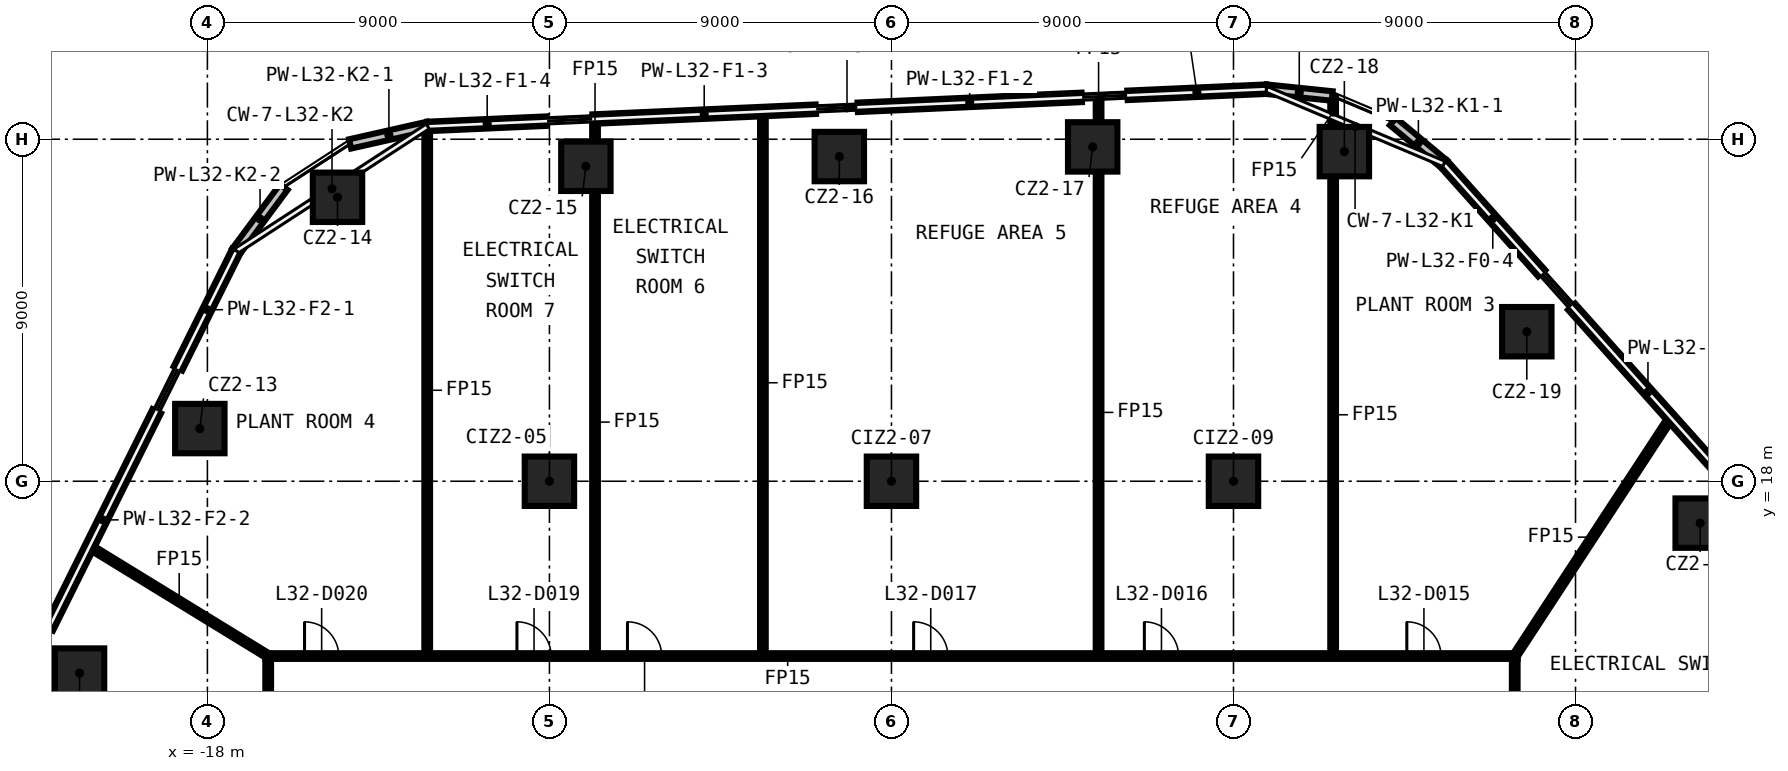
"""IFC4 building model, lengths in metres.
Left out: names, types, materials, properties, quantities, classifications, styles, units other than length and angle.
Written with IfcOpenShell. Run it as: python <this file> out.ifc"""

import sys

from ifc_helpers import new_model, si_unit, direction, frame, frame_2d, origin, origin_2d, place, context, subcontext, project, spatial, rectangle, extrude, element, fill, save


model = new_model("IFC4")
c1 = context("Model", 3, precision=1e-05, world=origin(), true_north=direction((0.0, 1.0)))
c2 = subcontext(c1, "Body", "Model", "MODEL_VIEW")
j1 = project(units=[si_unit("LENGTHUNIT", "METRE"), si_unit("PLANEANGLEUNIT", "RADIAN")], contexts=[c1])
p1 = place(None, origin())
s1 = spatial("IfcSite", under=j1, at=p1, CompositionType="ELEMENT")
p2 = place(p1, origin())
s2 = spatial("IfcBuilding", under=s1, at=p2, CompositionType="ELEMENT")
p3 = place(p2, frame((0.0, 0.0, 145.6)))
s3 = spatial("IfcBuildingStorey", under=s2, at=p3, CompositionType="ELEMENT", Elevation=145.6)
for number, where, z_axis, x_axis in (
    (1, (-21.364, 12.952, 0.0), (0.0, 0.0, 1.0), (1.0, 0.0, 0.0)),
    (2, (-18.199, 19.386, 0.0), (0.0, 0.0, 1.0), (1.0, 0.0, 0.0)),
    (3, (-14.576, 25.472, 0.0), (0.0, 0.0, 1.0), (1.0, 0.0, 0.0)),
    (4, (-8.041, 26.288, 0.0), (0.0, 0.0, 1.0), (1.0, 0.0, 0.0)),
    (5, (-1.372, 26.544, 0.0), (0.0, 0.0, 1.0), (1.0, 0.0, 0.0)),
    (6, (5.295, 26.798, 0.0), (0.0, 0.0, 1.0), (1.0, 0.0, 0.0)),
    (7, (11.917, 26.674, 0.0), (0.0, 0.0, 1.0), (1.0, 0.0, 0.0)),
    (8, (16.718, 21.935, 0.0), (0.0, 0.0, 1.0), (1.0, 0.0, 0.0)),
    (9, (21.28, 16.898, 0.0), (0.0, 0.0, 1.0), (1.0, 0.0, 0.0)),
    (10, (-9.0, 18.0, 0.0), (0.0, 0.0, 1.0), (1.0, 0.0, 0.0)),
    (11, (0.0, 18.0, 0.0), (0.0, 0.0, 1.0), (1.0, 0.0, 0.0)),
    (12, (9.0, 18.0, 0.0), (0.0, 0.0, 1.0), (1.0, 0.0, 0.0)),
):
    element("IfcColumn", number, at=place(p3, frame(where, z_axis=z_axis, x_axis=x_axis)), inside=s3, PredefinedType="COLUMN", context=c2, shape_type="SweptSolid", body=[
        extrude(rectangle(XDim=1.3, YDim=1.3, at=origin_2d()), origin(), (0.0, 0.0, 1.0), 5.55),
    ])
p4 = place(p3, frame((-16.475, 13.4, 0.0), z_axis=(0.0, 0.0, 1.0), x_axis=(1.0, 0.0, 0.0)))
e13 = element("IfcWall", 13, at=p4, inside=s3, PredefinedType="PARTITIONING", context=c2, shape_type="SweptSolid", body=[
    extrude(rectangle(XDim=32.95, YDim=0.15, at=frame_2d((16.475, 0.0))), origin(), (0.0, 0.0, 1.0), 5.55),
])
p5 = place(p4, frame((30.036, 0.0, 0.0)))
e14 = element("IfcOpeningElement", 14, at=p5, cuts=e13, PredefinedType="OPENING", context=c2, shape_type="SweptSolid", body=[
    extrude(rectangle(XDim=0.9, YDim=2.1, at=frame_2d((0.45, 1.05))), frame((0.0, 0.085, 0.0), z_axis=(0.0, -1.0, 0.0), x_axis=(1.0, 0.0, 0.0)), (0.0, 0.0, 1.0), 0.17),
])
p6 = place(p4, frame((23.129, 0.0, 0.0)))
e15 = element("IfcOpeningElement", 15, at=p6, cuts=e13, PredefinedType="OPENING", context=c2, shape_type="SweptSolid", body=[
    extrude(rectangle(XDim=0.9, YDim=2.1, at=frame_2d((0.45, 1.05))), frame((0.0, 0.085, 0.0), z_axis=(0.0, -1.0, 0.0), x_axis=(1.0, 0.0, 0.0)), (0.0, 0.0, 1.0), 0.17),
])
p7 = place(p4, frame((17.059, 0.0, 0.0)))
e16 = element("IfcOpeningElement", 16, at=p7, cuts=e13, PredefinedType="OPENING", context=c2, shape_type="SweptSolid", body=[
    extrude(rectangle(XDim=0.9, YDim=2.1, at=frame_2d((0.45, 1.05))), frame((0.0, 0.085, 0.0), z_axis=(0.0, -1.0, 0.0), x_axis=(1.0, 0.0, 0.0)), (0.0, 0.0, 1.0), 0.17),
])
p8 = place(p4, frame((9.529, 0.0, 0.0)))
e17 = element("IfcOpeningElement", 17, at=p8, cuts=e13, PredefinedType="OPENING", context=c2, shape_type="SweptSolid", body=[
    extrude(rectangle(XDim=0.9, YDim=2.1, at=frame_2d((0.45, 1.05))), frame((0.0, 0.085, 0.0), z_axis=(0.0, -1.0, 0.0), x_axis=(1.0, 0.0, 0.0)), (0.0, 0.0, 1.0), 0.17),
])
p9 = place(p4, frame((6.62, 0.0, 0.0)))
e18 = element("IfcOpeningElement", 18, at=p9, cuts=e13, PredefinedType="OPENING", context=c2, shape_type="SweptSolid", body=[
    extrude(rectangle(XDim=0.9, YDim=2.1, at=frame_2d((0.45, 1.05))), frame((0.0, 0.085, 0.0), z_axis=(0.0, -1.0, 0.0), x_axis=(1.0, 0.0, 0.0)), (0.0, 0.0, 1.0), 0.17),
])
p10 = place(p4, frame((1.031, 0.0, 0.0)))
e19 = element("IfcOpeningElement", 19, at=p10, cuts=e13, PredefinedType="OPENING", context=c2, shape_type="SweptSolid", body=[
    extrude(rectangle(XDim=0.9, YDim=2.1, at=frame_2d((0.45, 1.05))), frame((0.0, 0.085, 0.0), z_axis=(0.0, -1.0, 0.0), x_axis=(1.0, 0.0, 0.0)), (0.0, 0.0, 1.0), 0.17),
])
p11 = place(p3, frame((16.4, 13.4, 0.0), z_axis=(0.0, 0.0, 1.0), x_axis=(0.547576489489, 0.836755632284, 0.0)))
e20 = element("IfcWall", 20, at=p11, inside=s3, PredefinedType="PARTITIONING", context=c2, shape_type="SweptSolid", body=[
    extrude(rectangle(XDim=7.479, YDim=0.15, at=frame_2d((3.74, 0.0))), origin(), (0.0, 0.0, 1.0), 5.55),
])
p12 = place(p3, frame((16.4, 13.325, 0.0), z_axis=(0.0, 0.0, 1.0), x_axis=(0.0, -1.0, 0.0)))
e21 = element("IfcWall", 21, at=p12, inside=s3, PredefinedType="PARTITIONING", context=c2, shape_type="SweptSolid", body=[
    extrude(rectangle(XDim=26.65, YDim=0.15, at=frame_2d((13.325, 0.0))), origin(), (0.0, 0.0, 1.0), 5.55),
])
p13 = place(p12, frame((24.616, 0.0, 0.0)))
e22 = element("IfcOpeningElement", 22, at=p13, cuts=e21, PredefinedType="OPENING", context=c2, shape_type="SweptSolid", body=[
    extrude(rectangle(XDim=0.9, YDim=2.1, at=frame_2d((0.45, 1.05))), frame((0.0, 0.085, 0.0), z_axis=(0.0, -1.0, 0.0), x_axis=(1.0, 0.0, 0.0)), (0.0, 0.0, 1.0), 0.17),
])
p14 = place(p12, frame((17.503, 0.0, 0.0)))
e23 = element("IfcOpeningElement", 23, at=p14, cuts=e21, PredefinedType="OPENING", context=c2, shape_type="SweptSolid", body=[
    extrude(rectangle(XDim=0.9, YDim=2.1, at=frame_2d((0.45, 1.05))), frame((0.0, 0.085, 0.0), z_axis=(0.0, -1.0, 0.0), x_axis=(1.0, 0.0, 0.0)), (0.0, 0.0, 1.0), 0.17),
])
p15 = place(p12, frame((10.472, 0.0, 0.0)))
e24 = element("IfcOpeningElement", 24, at=p15, cuts=e21, PredefinedType="OPENING", context=c2, shape_type="SweptSolid", body=[
    extrude(rectangle(XDim=0.9, YDim=2.1, at=frame_2d((0.45, 1.05))), frame((0.0, 0.085, 0.0), z_axis=(0.0, -1.0, 0.0), x_axis=(1.0, 0.0, 0.0)), (0.0, 0.0, 1.0), 0.17),
])
p16 = place(p12, frame((6.104, 0.0, 0.0)))
e25 = element("IfcOpeningElement", 25, at=p16, cuts=e21, PredefinedType="OPENING", context=c2, shape_type="SweptSolid", body=[
    extrude(rectangle(XDim=0.9, YDim=2.1, at=frame_2d((0.45, 1.05))), frame((0.0, 0.085, 0.0), z_axis=(0.0, -1.0, 0.0), x_axis=(1.0, 0.0, 0.0)), (0.0, 0.0, 1.0), 0.17),
])
p17 = place(p12, frame((1.438, 0.0, 0.0)))
e26 = element("IfcOpeningElement", 26, at=p17, cuts=e21, PredefinedType="OPENING", context=c2, shape_type="SweptSolid", body=[
    extrude(rectangle(XDim=0.9, YDim=2.1, at=frame_2d((0.45, 1.05))), frame((0.0, 0.085, 0.0), z_axis=(0.0, -1.0, 0.0), x_axis=(1.0, 0.0, 0.0)), (0.0, 0.0, 1.0), 0.17),
])
p18 = place(p3, frame((11.622, 13.475, 0.0), z_axis=(0.0, 0.0, 1.0), x_axis=(0.0, 1.0, 0.0)))
e27 = element("IfcWall", 27, at=p18, inside=s3, PredefinedType="PARTITIONING", context=c2, shape_type="SweptSolid", body=[
    extrude(rectangle(XDim=12.549, YDim=0.15, at=frame_2d((6.274, 0.0))), origin(), (0.0, 0.0, 1.0), 5.55),
])
p19 = place(p3, frame((11.622, 27.324, 0.0), z_axis=(0.0, 0.0, 1.0), x_axis=(0.0, 1.0, 0.0)))
e28 = element("IfcWall", 28, at=p19, inside=s3, PredefinedType="PARTITIONING", context=c2, shape_type="SweptSolid", body=[
    extrude(rectangle(XDim=0.781, YDim=0.15, at=frame_2d((0.391, 0.0))), origin(), (0.0, 0.0, 1.0), 5.55),
])
p20 = place(p3, frame((5.45, 13.475, 0.0), z_axis=(0.0, 0.0, 1.0), x_axis=(0.0, 1.0, 0.0)))
e29 = element("IfcWall", 29, at=p20, inside=s3, PredefinedType="PARTITIONING", context=c2, shape_type="SweptSolid", body=[
    extrude(rectangle(XDim=12.673, YDim=0.15, at=frame_2d((6.336, 0.0))), origin(), (0.0, 0.0, 1.0), 5.55),
])
p21 = place(p3, frame((5.45, 27.448, 0.0), z_axis=(0.0, 0.0, 1.0), x_axis=(0.0, 1.0, 0.0)))
e30 = element("IfcWall", 30, at=p21, inside=s3, PredefinedType="PARTITIONING", context=c2, shape_type="SweptSolid", body=[
    extrude(rectangle(XDim=0.653, YDim=0.15, at=frame_2d((0.327, 0.0))), origin(), (0.0, 0.0, 1.0), 5.55),
])
p22 = place(p3, frame((-3.383, 13.475, 0.0), z_axis=(0.0, 0.0, 1.0), x_axis=(0.0, 1.0, 0.0)))
e31 = element("IfcWall", 31, at=p22, inside=s3, PredefinedType="PARTITIONING", context=c2, shape_type="SweptSolid", body=[
    extrude(rectangle(XDim=14.234, YDim=0.15, at=frame_2d((7.117, 0.0))), origin(), (0.0, 0.0, 1.0), 5.55),
])
p23 = place(p3, frame((-7.8, 13.475, 0.0), z_axis=(0.0, 0.0, 1.0), x_axis=(0.0, 1.0, 0.0)))
e32 = element("IfcWall", 32, at=p23, inside=s3, PredefinedType="PARTITIONING", context=c2, shape_type="SweptSolid", body=[
    extrude(rectangle(XDim=12.163, YDim=0.15, at=frame_2d((6.082, 0.0))), origin(), (0.0, 0.0, 1.0), 5.55),
])
p24 = place(p3, frame((-7.8, 26.938, 0.0), z_axis=(0.0, 0.0, 1.0), x_axis=(0.0, 1.0, 0.0)))
e33 = element("IfcWall", 33, at=p24, inside=s3, PredefinedType="PARTITIONING", context=c2, shape_type="SweptSolid", body=[
    extrude(rectangle(XDim=0.575, YDim=0.15, at=frame_2d((0.287, 0.0))), origin(), (0.0, 0.0, 1.0), 5.55),
])
p25 = place(p3, frame((-12.216, 13.475, 0.0), z_axis=(0.0, 0.0, 1.0), x_axis=(0.0, 1.0, 0.0)))
e34 = element("IfcWall", 34, at=p25, inside=s3, PredefinedType="PARTITIONING", context=c2, shape_type="SweptSolid", body=[
    extrude(rectangle(XDim=13.839, YDim=0.15, at=frame_2d((6.919, 0.0))), origin(), (0.0, 0.0, 1.0), 5.55),
])
p26 = place(p3, frame((-16.4, -13.325, 0.0), z_axis=(0.0, 0.0, 1.0), x_axis=(0.0, 1.0, 0.0)))
e35 = element("IfcWall", 35, at=p26, inside=s3, PredefinedType="PARTITIONING", context=c2, shape_type="SweptSolid", body=[
    extrude(rectangle(XDim=26.65, YDim=0.15, at=frame_2d((13.325, 0.0))), origin(), (0.0, 0.0, 1.0), 5.55),
])
p27 = place(p26, frame((10.777, 0.0, 0.0)))
e36 = element("IfcOpeningElement", 36, at=p27, cuts=e35, PredefinedType="OPENING", context=c2, shape_type="SweptSolid", body=[
    extrude(rectangle(XDim=0.9, YDim=2.1, at=frame_2d((0.45, 1.05))), frame((0.0, 0.085, 0.0), z_axis=(0.0, -1.0, 0.0), x_axis=(1.0, 0.0, 0.0)), (0.0, 0.0, 1.0), 0.17),
])
p28 = place(p26, frame((6.051, 0.0, 0.0)))
e37 = element("IfcOpeningElement", 37, at=p28, cuts=e35, PredefinedType="OPENING", context=c2, shape_type="SweptSolid", body=[
    extrude(rectangle(XDim=0.9, YDim=2.1, at=frame_2d((0.45, 1.05))), frame((0.0, 0.085, 0.0), z_axis=(0.0, -1.0, 0.0), x_axis=(1.0, 0.0, 0.0)), (0.0, 0.0, 1.0), 0.17),
])
p29 = place(p26, frame((1.634, 0.0, 0.0)))
e38 = element("IfcOpeningElement", 38, at=p29, cuts=e35, PredefinedType="OPENING", context=c2, shape_type="SweptSolid", body=[
    extrude(rectangle(XDim=0.9, YDim=2.1, at=frame_2d((0.45, 1.05))), frame((0.0, 0.085, 0.0), z_axis=(0.0, -1.0, 0.0), x_axis=(1.0, 0.0, 0.0)), (0.0, 0.0, 1.0), 0.17),
])
p30 = place(p26, frame((24.559, 0.0, 0.0)))
e39 = element("IfcOpeningElement", 39, at=p30, cuts=e35, PredefinedType="OPENING", context=c2, shape_type="SweptSolid", body=[
    extrude(rectangle(XDim=0.9, YDim=2.1, at=frame_2d((0.45, 1.05))), frame((0.0, 0.085, 0.0), z_axis=(0.0, -1.0, 0.0), x_axis=(1.0, 0.0, 0.0)), (0.0, 0.0, 1.0), 0.17),
])
p31 = place(p26, frame((19.488, 0.0, 0.0)))
e40 = element("IfcOpeningElement", 40, at=p31, cuts=e35, PredefinedType="OPENING", context=c2, shape_type="SweptSolid", body=[
    extrude(rectangle(XDim=0.9, YDim=2.1, at=frame_2d((0.45, 1.05))), frame((0.0, 0.085, 0.0), z_axis=(0.0, -1.0, 0.0), x_axis=(1.0, 0.0, 0.0)), (0.0, 0.0, 1.0), 0.17),
])
p32 = place(p26, frame((14.977, 0.0, 0.0)))
e41 = element("IfcOpeningElement", 41, at=p32, cuts=e35, PredefinedType="OPENING", context=c2, shape_type="SweptSolid", body=[
    extrude(rectangle(XDim=0.9, YDim=2.1, at=frame_2d((0.45, 1.05))), frame((0.0, 0.085, 0.0), z_axis=(0.0, -1.0, 0.0), x_axis=(1.0, 0.0, 0.0)), (0.0, 0.0, 1.0), 0.17),
])
p33 = place(p3, frame((-21.085, 16.272, 0.0), z_axis=(0.0, 0.0, 1.0), x_axis=(0.85254186304, -0.52265894402, 0.0)))
e42 = element("IfcWall", 42, at=p33, inside=s3, PredefinedType="PARTITIONING", context=c2, shape_type="SweptSolid", body=[
    extrude(rectangle(XDim=5.495, YDim=0.15, at=frame_2d((2.748, 0.0))), origin(), (0.0, 0.0, 1.0), 5.55),
])
p34 = place(p3, frame((21.914, 18.103, 0.0), z_axis=(0.0, 0.0, 1.0), x_axis=(-0.666722592177, 0.745305967426, 0.0)))
e43 = element("IfcWall", 43, at=p34, inside=s3, PredefinedType="SOLIDWALL", context=c2, shape_type="SweptSolid", body=[
    extrude(rectangle(XDim=6.024, YDim=0.25, at=frame_2d((3.012, 0.0))), origin(), (0.0, 0.0, 1.0), 5.55),
])
p35 = place(p3, frame((17.11, 23.473, 0.0), z_axis=(0.0, 0.0, 1.0), x_axis=(-0.666726487427, 0.745302482864, 0.0)))
e44 = element("IfcWall", 44, at=p35, inside=s3, PredefinedType="SOLIDWALL", context=c2, shape_type="SweptSolid", body=[
    extrude(rectangle(XDim=3.862, YDim=0.25, at=frame_2d((1.931, 0.0))), origin(), (0.0, 0.0, 1.0), 5.55),
])
for number, where, z_axis, x_axis in (
    (45, (14.535, 26.351, 0.0), (0.0, 0.0, 1.0), (-0.769, 0.639, 0.0)),
    (46, (11.597, 28.138, 0.0), (0.0, 0.0, 1.0), (-0.995, 0.103, 0.0)),
):
    element("IfcWall", number, at=place(p3, frame(where, z_axis=z_axis, x_axis=x_axis)), inside=s3, PredefinedType="SOLIDWALL", context=c2, shape_type="SweptSolid", body=[
        extrude(rectangle(XDim=1.742, YDim=0.25, at=frame_2d((0.871, 0.0))), origin(), (0.0, 0.0, 1.0), 5.55),
    ])
p36 = place(p3, frame((9.864, 28.317, 0.0), z_axis=(0.0, 0.0, 1.0), x_axis=(-0.999014003877, -0.044396171651, 0.0)))
e47 = element("IfcWall", 47, at=p36, inside=s3, PredefinedType="SOLIDWALL", context=c2, shape_type="SweptSolid", body=[
    extrude(rectangle(XDim=3.657, YDim=0.25, at=frame_2d((1.829, 0.0))), origin(), (0.0, 0.0, 1.0), 5.55),
])
p37 = place(p3, frame((5.008, 28.101, 0.0), z_axis=(0.0, 0.0, 1.0), x_axis=(-0.999016251503, -0.044345566112, 0.0)))
e48 = element("IfcWall", 48, at=p37, inside=s3, PredefinedType="SOLIDWALL", context=c2, shape_type="SweptSolid", body=[
    extrude(rectangle(XDim=5.902, YDim=0.25, at=frame_2d((2.951, 0.0))), origin(), (0.0, 0.0, 1.0), 5.55),
])
p38 = place(p3, frame((-1.99, 27.791, 0.0), z_axis=(0.0, 0.0, 1.0), x_axis=(-0.999014338485, -0.044388641583, 0.0)))
e49 = element("IfcWall", 49, at=p38, inside=s3, PredefinedType="SOLIDWALL", context=c2, shape_type="SweptSolid", body=[
    extrude(rectangle(XDim=5.88, YDim=0.25, at=frame_2d((2.94, 0.0))), origin(), (0.0, 0.0, 1.0), 5.55),
])
p39 = place(p3, frame((-9.073, 27.476, 0.0), z_axis=(0.0, 0.0, 1.0), x_axis=(-0.999013499265, -0.044407525117, 0.0)))
e50 = element("IfcWall", 50, at=p39, inside=s3, PredefinedType="SOLIDWALL", context=c2, shape_type="SweptSolid", body=[
    extrude(rectangle(XDim=3.134, YDim=0.25, at=frame_2d((1.567, 0.0))), origin(), (0.0, 0.0, 1.0), 5.55),
])
for number, where, z_axis, x_axis in (
    (51, (-12.203, 27.337, 0.0), (0.0, 0.0, 1.0), (-0.975, -0.22, 0.0)),
    (52, (-15.991, 25.74, 0.0), (0.0, 0.0, 1.0), (-0.596, -0.803, 0.0)),
):
    element("IfcWall", number, at=place(p3, frame(where, z_axis=z_axis, x_axis=x_axis)), inside=s3, PredefinedType="SOLIDWALL", context=c2, shape_type="SweptSolid", body=[
        extrude(rectangle(XDim=2.093, YDim=0.25, at=frame_2d((1.046, 0.0))), origin(), (0.0, 0.0, 1.0), 5.55),
    ])
p40 = place(p3, frame((-17.238, 24.06, 0.0), z_axis=(0.0, 0.0, 1.0), x_axis=(-0.444920690852, -0.895569974291, 0.0)))
e53 = element("IfcWall", 53, at=p40, inside=s3, PredefinedType="SOLIDWALL", context=c2, shape_type="SweptSolid", body=[
    extrude(rectangle(XDim=3.452, YDim=0.25, at=frame_2d((1.726, 0.0))), origin(), (0.0, 0.0, 1.0), 5.55),
])
p41 = place(p3, frame((-19.334, 19.842, 0.0), z_axis=(0.0, 0.0, 1.0), x_axis=(-0.444917158653, -0.895571729085, 0.0)))
e54 = element("IfcWall", 54, at=p41, inside=s3, PredefinedType="SOLIDWALL", context=c2, shape_type="SweptSolid", body=[
    extrude(rectangle(XDim=6.383, YDim=0.25, at=frame_2d((3.191, 0.0))), origin(), (0.0, 0.0, 1.0), 5.55),
])
p42 = place(p5, origin())
e55 = element("IfcDoor", 55, at=p42, inside=s3, OperationType="SINGLE_SWING_RIGHT", PredefinedType="DOOR", context=c2, shape_type="SweptSolid", body=[
    extrude(rectangle(XDim=0.9, YDim=2.1, at=frame_2d((0.45, 1.05))), frame((0.0, 0.025, 0.0), z_axis=(0.0, -1.0, 0.0), x_axis=(1.0, 0.0, 0.0)), (0.0, 0.0, 1.0), 0.05),
])
fill(e14, e55)
p43 = place(p6, origin())
e56 = element("IfcDoor", 56, at=p43, inside=s3, OperationType="SINGLE_SWING_LEFT", PredefinedType="DOOR", context=c2, shape_type="SweptSolid", body=[
    extrude(rectangle(XDim=0.9, YDim=2.1, at=frame_2d((0.45, 1.05))), frame((0.0, 0.025, 0.0), z_axis=(0.0, -1.0, 0.0), x_axis=(1.0, 0.0, 0.0)), (0.0, 0.0, 1.0), 0.05),
])
fill(e15, e56)
p44 = place(p7, origin())
e57 = element("IfcDoor", 57, at=p44, inside=s3, OperationType="SINGLE_SWING_RIGHT", PredefinedType="DOOR", context=c2, shape_type="SweptSolid", body=[
    extrude(rectangle(XDim=0.9, YDim=2.1, at=frame_2d((0.45, 1.05))), frame((0.0, 0.025, 0.0), z_axis=(0.0, -1.0, 0.0), x_axis=(1.0, 0.0, 0.0)), (0.0, 0.0, 1.0), 0.05),
])
fill(e16, e57)
p45 = place(p8, origin())
e58 = element("IfcDoor", 58, at=p45, inside=s3, OperationType="SINGLE_SWING_LEFT", PredefinedType="DOOR", context=c2, shape_type="SweptSolid", body=[
    extrude(rectangle(XDim=0.9, YDim=2.1, at=frame_2d((0.45, 1.05))), frame((0.0, 0.025, 0.0), z_axis=(0.0, -1.0, 0.0), x_axis=(1.0, 0.0, 0.0)), (0.0, 0.0, 1.0), 0.05),
])
fill(e17, e58)
p46 = place(p9, origin())
e59 = element("IfcDoor", 59, at=p46, inside=s3, OperationType="SINGLE_SWING_RIGHT", PredefinedType="DOOR", context=c2, shape_type="SweptSolid", body=[
    extrude(rectangle(XDim=0.9, YDim=2.1, at=frame_2d((0.45, 1.05))), frame((0.0, 0.025, 0.0), z_axis=(0.0, -1.0, 0.0), x_axis=(1.0, 0.0, 0.0)), (0.0, 0.0, 1.0), 0.05),
])
fill(e18, e59)
p47 = place(p10, origin())
e60 = element("IfcDoor", 60, at=p47, inside=s3, OperationType="SINGLE_SWING_LEFT", PredefinedType="DOOR", context=c2, shape_type="SweptSolid", body=[
    extrude(rectangle(XDim=0.9, YDim=2.1, at=frame_2d((0.45, 1.05))), frame((0.0, 0.025, 0.0), z_axis=(0.0, -1.0, 0.0), x_axis=(1.0, 0.0, 0.0)), (0.0, 0.0, 1.0), 0.05),
])
fill(e19, e60)
save(model, sys.argv[1])
